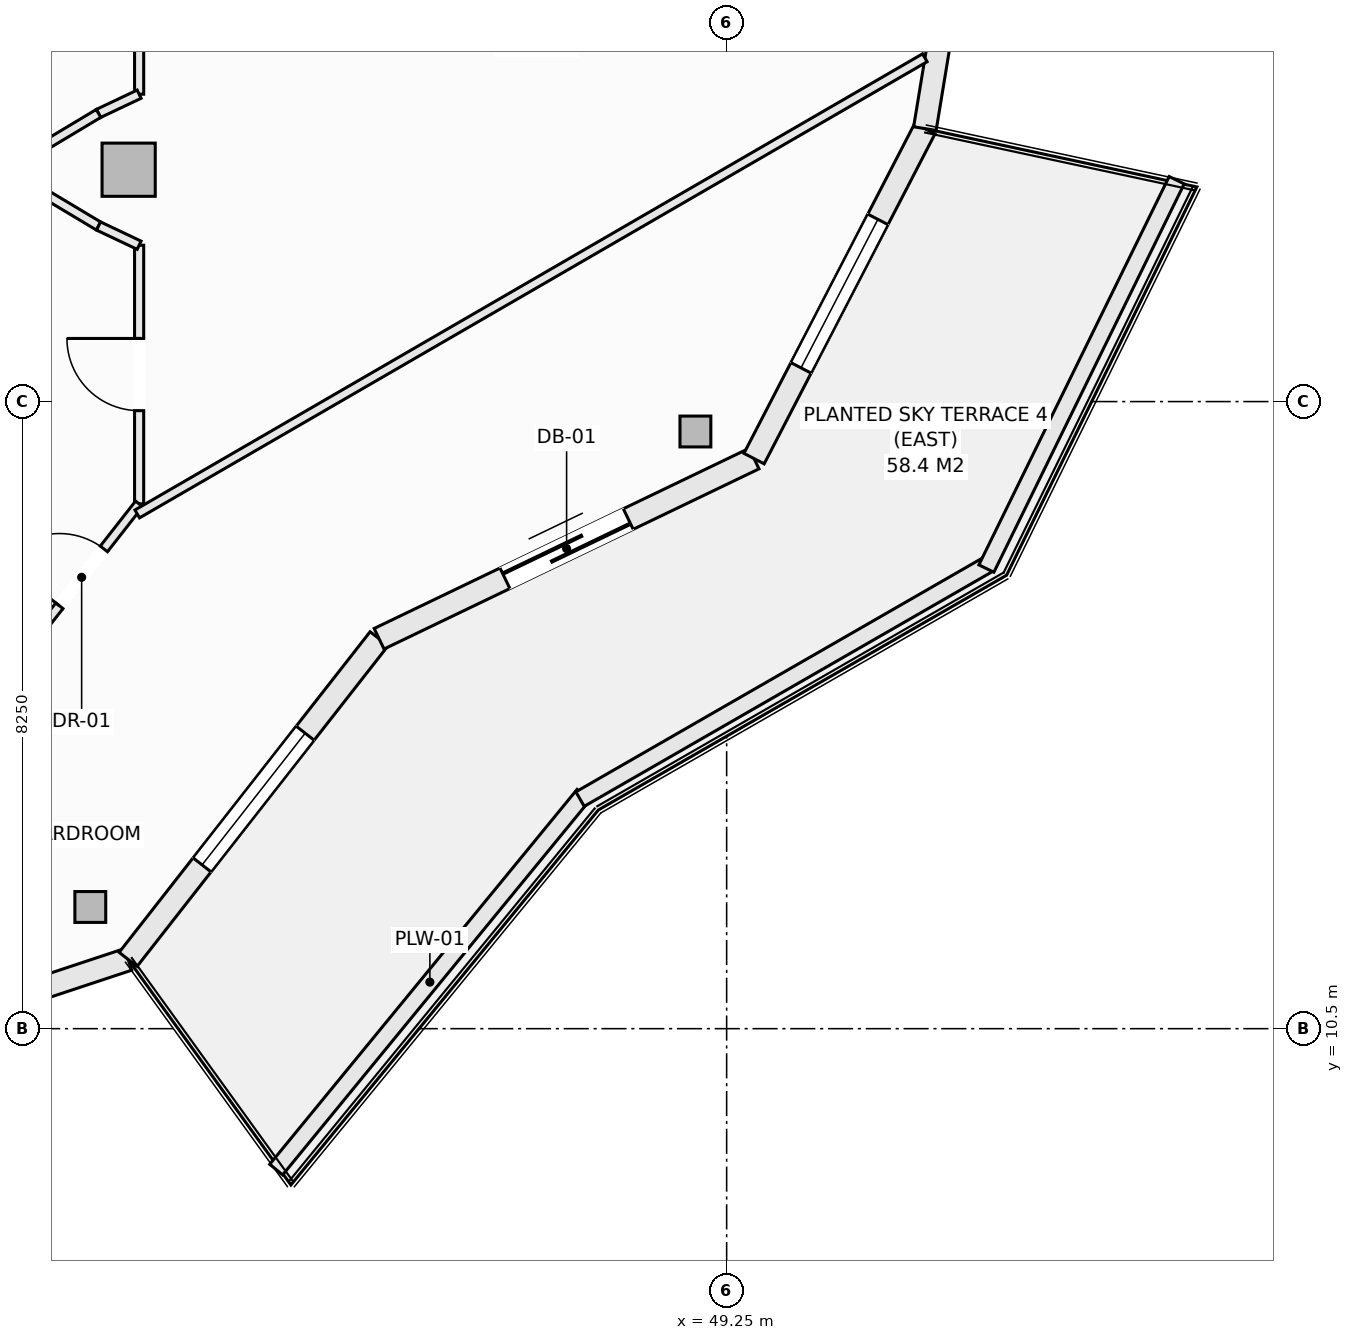
"""IFC4 building model, lengths in metres.
Left out: names, types, materials, properties, quantities, classifications, styles, units other than length and angle.
Written with IfcOpenShell. Run it as: python <this file> out.ifc"""

import sys

from ifc_helpers import new_model, si_unit, direction, frame, frame_2d, origin, origin_2d, place, context, subcontext, project, spatial, rectangle, hollow_rectangle, extrude, element, fill, save


model = new_model("IFC4")
c1 = context("Model", 3, precision=1e-05, world=origin(), true_north=direction((0.0, 1.0)))
c2 = subcontext(c1, "Body", "Model", "MODEL_VIEW")
j1 = project(units=[si_unit("LENGTHUNIT", "METRE"), si_unit("PLANEANGLEUNIT", "RADIAN")], contexts=[c1])
p1 = place(None, origin())
s1 = spatial("IfcSite", under=j1, at=p1, CompositionType="ELEMENT")
p2 = place(p1, origin())
s2 = spatial("IfcBuilding", under=s1, at=p2, CompositionType="ELEMENT")
p3 = place(p2, frame((0.0, 0.0, 252.5)))
s3 = spatial("IfcBuildingStorey", under=s2, at=p3, CompositionType="ELEMENT", Elevation=252.5)
for number, where, z_axis, x_axis in (
    (1, (40.878, 12.101, -0.27), (0.0, 0.0, 1.0), (1.0, 0.0, 0.0)),
    (2, (48.839, 18.356, -0.27), (0.0, 0.0, 1.0), (1.0, 0.0, 0.0)),
):
    element("IfcColumn", number, at=place(p3, frame(where, z_axis=z_axis, x_axis=x_axis)), inside=s3, PredefinedType="COLUMN", context=c2, shape_type="SweptSolid", body=[
        extrude(hollow_rectangle(XDim=0.406, YDim=0.406, WallThickness=0.016, at=origin_2d()), origin(), (0.0, 0.0, 1.0), 3.3),
    ])
p4 = place(p3, frame((41.382, 21.801, -0.27), z_axis=(0.0, 0.0, 1.0), x_axis=(1.0, 0.0, 0.0)))
e3 = element("IfcColumn", 3, at=p4, inside=s3, PredefinedType="COLUMN", context=c2, shape_type="SweptSolid", body=[
    extrude(rectangle(XDim=0.7, YDim=0.7, at=origin_2d()), origin(), (0.0, 0.0, 1.0), 3.3),
])
p5 = place(p3, frame((35.948, 9.613, 0.0), z_axis=(0.0, 0.0, 1.0), x_axis=(0.949232769585, 0.314574552605, 0.0)))
e4 = element("IfcWall", 4, at=p5, inside=s3, PredefinedType="SOLIDWALL", context=c2, shape_type="SweptSolid", body=[
    extrude(rectangle(XDim=5.717, YDim=0.3, at=frame_2d((2.858, 0.0))), origin(), (0.0, 0.0, 1.0), 2.605),
])
p6 = place(p5, frame((1.758, 0.0, 0.72)))
e5 = element("IfcOpeningElement", 5, at=p6, cuts=e4, PredefinedType="OPENING", context=c2, shape_type="SweptSolid", body=[
    extrude(rectangle(XDim=2.2, YDim=1.65, at=frame_2d((1.1, 0.825))), frame((0.0, 0.16, 0.0), z_axis=(0.0, -1.0, 0.0), x_axis=(1.0, 0.0, 0.0)), (0.0, 0.0, 1.0), 0.32),
])
p7 = place(p3, frame((41.375, 11.412, 0.0), z_axis=(0.0, 0.0, 1.0), x_axis=(0.61644588519, 0.787397276241, 0.0)))
e6 = element("IfcWall", 6, at=p7, inside=s3, PredefinedType="SOLIDWALL", context=c2, shape_type="SweptSolid", body=[
    extrude(rectangle(XDim=5.357, YDim=0.3, at=frame_2d((2.678, 0.0))), origin(), (0.0, 0.0, 1.0), 2.605),
])
p8 = place(p7, frame((1.579, 0.0, 0.72)))
e7 = element("IfcOpeningElement", 7, at=p8, cuts=e6, PredefinedType="OPENING", context=c2, shape_type="SweptSolid", body=[
    extrude(rectangle(XDim=2.2, YDim=1.65, at=frame_2d((1.1, 0.825))), frame((0.0, 0.16, 0.0), z_axis=(0.0, -1.0, 0.0), x_axis=(1.0, 0.0, 0.0)), (0.0, 0.0, 1.0), 0.32),
])
p9 = place(p3, frame((44.677, 15.63, 0.0), z_axis=(0.0, 0.0, 1.0), x_axis=(0.901355238351, 0.433080517106, 0.0)))
e8 = element("IfcWall", 8, at=p9, inside=s3, PredefinedType="SOLIDWALL", context=c2, shape_type="SweptSolid", body=[
    extrude(rectangle(XDim=5.473, YDim=0.3, at=frame_2d((2.737, 0.0))), origin(), (0.0, 0.0, 1.0), 2.605),
])
p10 = place(p9, frame((1.837, 0.0, 0.0)))
e9 = element("IfcOpeningElement", 9, at=p10, cuts=e8, PredefinedType="OPENING", context=c2, shape_type="SweptSolid", body=[
    extrude(rectangle(XDim=1.8, YDim=2.25, at=frame_2d((0.9, 1.125))), frame((0.0, 0.16, 0.0), z_axis=(0.0, -1.0, 0.0), x_axis=(1.0, 0.0, 0.0)), (0.0, 0.0, 1.0), 0.32),
])
p11 = place(p3, frame((49.611, 18.0, 0.0), z_axis=(0.0, 0.0, 1.0), x_axis=(0.459793771602, 0.888025724625, 0.0)))
e10 = element("IfcWall", 10, at=p11, inside=s3, PredefinedType="SOLIDWALL", context=c2, shape_type="SweptSolid", body=[
    extrude(rectangle(XDim=4.889, YDim=0.3, at=frame_2d((2.444, 0.0))), origin(), (0.0, 0.0, 1.0), 2.605),
])
p12 = place(p11, frame((1.344, 0.0, 0.72)))
e11 = element("IfcOpeningElement", 11, at=p12, cuts=e10, PredefinedType="OPENING", context=c2, shape_type="SweptSolid", body=[
    extrude(rectangle(XDim=2.2, YDim=1.65, at=frame_2d((1.1, 0.825))), frame((0.0, 0.16, 0.0), z_axis=(0.0, -1.0, 0.0), x_axis=(1.0, 0.0, 0.0)), (0.0, 0.0, 1.0), 0.32),
])
p13 = place(p3, frame((51.858, 22.341, 0.0), z_axis=(0.0, 0.0, 1.0), x_axis=(0.162369371657, 0.986730047758, 0.0)))
e12 = element("IfcWall", 12, at=p13, inside=s3, PredefinedType="SOLIDWALL", context=c2, shape_type="SweptSolid", body=[
    extrude(rectangle(XDim=4.721, YDim=0.3, at=frame_2d((2.361, 0.0))), origin(), (0.0, 0.0, 1.0), 2.605),
])
p14 = place(p13, frame((1.261, 0.0, 0.72)))
e13 = element("IfcOpeningElement", 13, at=p14, cuts=e12, PredefinedType="OPENING", context=c2, shape_type="SweptSolid", body=[
    extrude(rectangle(XDim=2.2, YDim=1.65, at=frame_2d((1.1, 0.825))), frame((0.0, 0.16, 0.0), z_axis=(0.0, -1.0, 0.0), x_axis=(1.0, 0.0, 0.0)), (0.0, 0.0, 1.0), 0.32),
])
p15 = place(p3, frame((43.323, 8.646, 0.0), z_axis=(0.0, 0.0, 1.0), x_axis=(0.63407318032, 0.77327304492, 0.0)))
e14 = element("IfcWall", 14, at=p15, inside=s3, PredefinedType="PARAPET", context=c2, shape_type="SweptSolid", body=[
    extrude(rectangle(XDim=6.379, YDim=0.22, at=frame_2d((3.189, 0.0))), origin(), (0.0, 0.0, 1.0), 0.52),
])
p16 = place(p3, frame((47.321, 13.521, 0.0), z_axis=(0.0, 0.0, 1.0), x_axis=(0.866901621005, 0.49847926687, 0.0)))
e15 = element("IfcWall", 15, at=p16, inside=s3, PredefinedType="PARAPET", context=c2, shape_type="SweptSolid", body=[
    extrude(rectangle(XDim=6.197, YDim=0.22, at=frame_2d((3.098, 0.0))), origin(), (0.0, 0.0, 1.0), 0.52),
])
p17 = place(p3, frame((52.667, 16.553, 0.0), z_axis=(0.0, 0.0, 1.0), x_axis=(0.440058847499, 0.897968936399, 0.0)))
e16 = element("IfcWall", 16, at=p17, inside=s3, PredefinedType="PARAPET", context=c2, shape_type="SweptSolid", body=[
    extrude(rectangle(XDim=5.689, YDim=0.22, at=frame_2d((2.845, 0.0))), origin(), (0.0, 0.0, 1.0), 0.52),
])
p18 = place(p3, frame((41.52, 17.404, 0.0), z_axis=(0.0, 0.0, 1.0), x_axis=(0.0, 1.0, 0.0)))
e17 = element("IfcWall", 17, at=p18, inside=s3, PredefinedType="PARTITIONING", context=c2, shape_type="SweptSolid", body=[
    extrude(rectangle(XDim=3.403, YDim=0.12, at=frame_2d((1.701, 0.0))), origin(), (0.0, 0.0, 1.0), 3.03),
])
p19 = place(p18, frame((1.227, 0.0, 0.0)))
e18 = element("IfcOpeningElement", 18, at=p19, cuts=e17, PredefinedType="OPENING", context=c2, shape_type="SweptSolid", body=[
    extrude(rectangle(XDim=0.95, YDim=2.1, at=frame_2d((0.475, 1.05))), frame((0.0, 0.07, 0.0), z_axis=(0.0, -1.0, 0.0), x_axis=(1.0, 0.0, 0.0)), (0.0, 0.0, 1.0), 0.14),
])
p20 = place(p3, frame((41.52, 22.794, 0.0), z_axis=(0.0, 0.0, 1.0), x_axis=(0.0, 1.0, 0.0)))
e19 = element("IfcWall", 19, at=p20, inside=s3, PredefinedType="PARTITIONING", context=c2, shape_type="SweptSolid", body=[
    extrude(rectangle(XDim=8.412, YDim=0.12, at=frame_2d((4.206, 0.0))), origin(), (0.0, 0.0, 1.0), 2.478),
])
p21 = place(p3, frame((40.986, 22.541, 0.0), z_axis=(0.0, 0.0, 1.0), x_axis=(0.903729424576, 0.428104107847, 0.0)))
e20 = element("IfcWall", 20, at=p21, inside=s3, PredefinedType="PARTITIONING", context=c2, shape_type="SweptSolid", body=[
    extrude(rectangle(XDim=0.591, YDim=0.12, at=frame_2d((0.295, 0.0))), origin(), (0.0, 0.0, 1.0), 3.03),
])
p22 = place(p3, frame((39.75, 21.8, 0.0), z_axis=(0.0, 0.0, 1.0), x_axis=(0.857702120906, 0.514146935996, 0.0)))
e21 = element("IfcWall", 21, at=p22, inside=s3, PredefinedType="PARTITIONING", context=c2, shape_type="SweptSolid", body=[
    extrude(rectangle(XDim=1.441, YDim=0.12, at=frame_2d((0.721, 0.0))), origin(), (0.0, 0.0, 1.0), 3.03),
])
p23 = place(p3, frame((39.81, 21.764, 0.0), z_axis=(0.0, 0.0, 1.0), x_axis=(0.858011245414, -0.513630901273, 0.0)))
e22 = element("IfcWall", 22, at=p23, inside=s3, PredefinedType="PARTITIONING", context=c2, shape_type="SweptSolid", body=[
    extrude(rectangle(XDim=1.37, YDim=0.12, at=frame_2d((0.685, 0.0))), origin(), (0.0, 0.0, 1.0), 3.03),
])
p24 = place(p3, frame((40.986, 21.06, 0.0), z_axis=(0.0, 0.0, 1.0), x_axis=(0.90356951601, -0.428441512621, 0.0)))
e23 = element("IfcWall", 23, at=p24, inside=s3, PredefinedType="PARTITIONING", context=c2, shape_type="SweptSolid", body=[
    extrude(rectangle(XDim=0.591, YDim=0.12, at=frame_2d((0.295, 0.0))), origin(), (0.0, 0.0, 1.0), 3.03),
])
p25 = place(p3, frame((39.662, 15.031, 0.0), z_axis=(0.0, 0.0, 1.0), x_axis=(0.616500468458, 0.787354540465, 0.0)))
e24 = element("IfcWall", 24, at=p25, inside=s3, PredefinedType="PARTITIONING", context=c2, shape_type="SweptSolid", body=[
    extrude(rectangle(XDim=3.014, YDim=0.12, at=frame_2d((1.507, 0.0))), origin(), (0.0, 0.0, 1.0), 3.03),
])
p26 = place(p25, frame((1.312, 0.0, 0.0)))
e25 = element("IfcOpeningElement", 25, at=p26, cuts=e24, PredefinedType="OPENING", context=c2, shape_type="SweptSolid", body=[
    extrude(rectangle(XDim=0.95, YDim=2.1, at=frame_2d((0.475, 1.05))), frame((0.0, 0.07, 0.0), z_axis=(0.0, -1.0, 0.0), x_axis=(1.0, 0.0, 0.0)), (0.0, 0.0, 1.0), 0.14),
])
p27 = place(p3, frame((41.495, 17.272, 0.0), z_axis=(0.0, 0.0, 1.0), x_axis=(0.865359277242, 0.501151994201, 0.0)))
e26 = element("IfcWall", 26, at=p27, inside=s3, PredefinedType="PARTITIONING", context=c2, shape_type="SweptSolid", body=[
    extrude(rectangle(XDim=11.975, YDim=0.12, at=frame_2d((5.987, 0.0))), origin(), (0.0, 0.0, 1.0), 3.03),
])
p28 = place(p8, origin())
e27 = element("IfcWindow", 27, at=p28, inside=s3, PartitioningType="SINGLE_PANEL", PredefinedType="WINDOW", context=c2, shape_type="SweptSolid", body=[
    extrude(rectangle(XDim=2.2, YDim=1.65, at=frame_2d((1.1, 0.825))), frame((0.0, 0.03, 0.0), z_axis=(0.0, -1.0, 0.0), x_axis=(1.0, 0.0, 0.0)), (0.0, 0.0, 1.0), 0.06),
])
fill(e7, e27)
p29 = place(p10, frame((1.8, 0.0, 0.0), z_axis=(0.0, 0.0, 1.0), x_axis=(-1.0, 0.0, 0.0)))
e28 = element("IfcDoor", 28, at=p29, inside=s3, OperationType="SLIDING_TO_LEFT", PredefinedType="DOOR", context=c2, shape_type="SweptSolid", body=[
    extrude(rectangle(XDim=1.8, YDim=2.25, at=frame_2d((0.9, 1.125))), frame((0.0, 0.025, 0.0), z_axis=(0.0, -1.0, 0.0), x_axis=(1.0, 0.0, 0.0)), (0.0, 0.0, 1.0), 0.05),
])
fill(e9, e28)
p30 = place(p12, origin())
e29 = element("IfcWindow", 29, at=p30, inside=s3, PartitioningType="SINGLE_PANEL", PredefinedType="WINDOW", context=c2, shape_type="SweptSolid", body=[
    extrude(rectangle(XDim=2.2, YDim=1.65, at=frame_2d((1.1, 0.825))), frame((0.0, 0.03, 0.0), z_axis=(0.0, -1.0, 0.0), x_axis=(1.0, 0.0, 0.0)), (0.0, 0.0, 1.0), 0.06),
])
fill(e11, e29)
p31 = place(p26, origin())
e30 = element("IfcDoor", 30, at=p31, inside=s3, OperationType="SINGLE_SWING_LEFT", PredefinedType="DOOR", context=c2, shape_type="SweptSolid", body=[
    extrude(rectangle(XDim=0.95, YDim=2.1, at=frame_2d((0.475, 1.05))), frame((0.0, 0.025, 0.0), z_axis=(0.0, -1.0, 0.0), x_axis=(1.0, 0.0, 0.0)), (0.0, 0.0, 1.0), 0.05),
])
fill(e25, e30)
p32 = place(p19, origin())
e31 = element("IfcDoor", 31, at=p32, inside=s3, OperationType="SINGLE_SWING_RIGHT", PredefinedType="DOOR", context=c2, shape_type="SweptSolid", body=[
    extrude(rectangle(XDim=0.95, YDim=2.1, at=frame_2d((0.475, 1.05))), frame((0.0, 0.025, 0.0), z_axis=(0.0, -1.0, 0.0), x_axis=(1.0, 0.0, 0.0)), (0.0, 0.0, 1.0), 0.05),
])
fill(e18, e31)
save(model, sys.argv[1])
